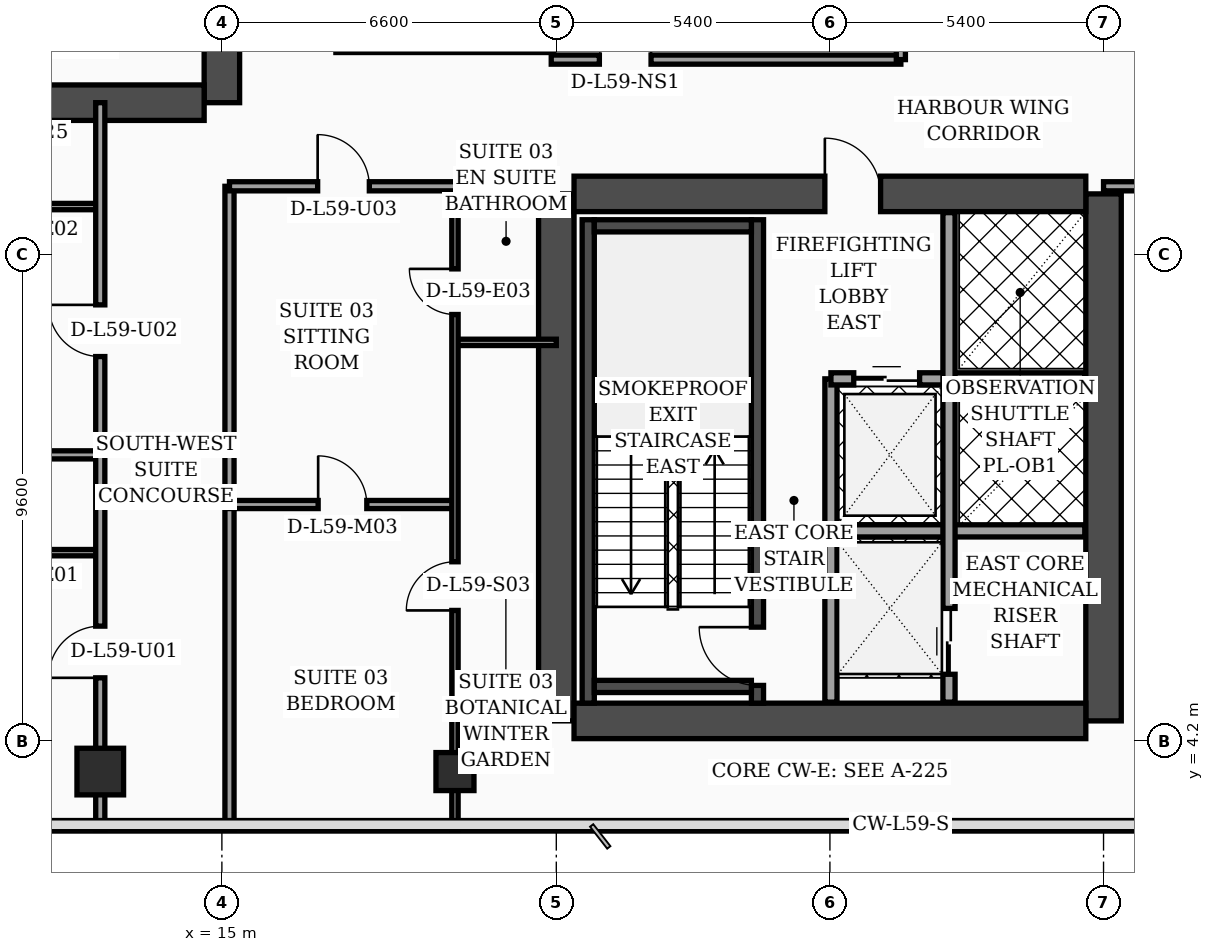
"""IFC4 building model, lengths in metres.
Left out: names, types, materials, properties, quantities, classifications, styles, units other than length and angle.
Written with IfcOpenShell. Run it as: python <this file> out.ifc"""

import sys

from ifc_helpers import new_model, si_unit, direction, frame, frame_2d, origin, origin_2d, place, context, subcontext, project, spatial, rectangle, hollow_rectangle, extrude, element, fill, save


model = new_model("IFC4")
c1 = context("Model", 3, precision=1e-05, world=origin(), true_north=direction((0.0, 1.0)))
c2 = subcontext(c1, "Body", "Model", "MODEL_VIEW")
j1 = project(units=[si_unit("LENGTHUNIT", "METRE"), si_unit("PLANEANGLEUNIT", "RADIAN")], contexts=[c1])
p1 = place(None, origin())
s1 = spatial("IfcSite", under=j1, at=p1, CompositionType="ELEMENT")
p2 = place(p1, origin())
s2 = spatial("IfcBuilding", under=s1, at=p2, CompositionType="ELEMENT")
p3 = place(p2, frame((0.0, 0.0, 239.3)))
s3 = spatial("IfcBuildingStorey", under=s2, at=p3, CompositionType="ELEMENT", Elevation=239.3)
p4 = place(p3, frame((15.0, 16.8, 0.0), z_axis=(0.0, 0.0, 1.0), x_axis=(0.0, 1.0, 0.0)))
e1 = element("IfcWall", 1, at=p4, inside=s3, PredefinedType="SHEAR", context=c2, shape_type="SweptSolid", body=[
    extrude(rectangle(XDim=21.6, YDim=0.7, at=frame_2d((10.8, 0.0))), origin(), (0.0, 0.0, 1.0), 4.05),
])
p5 = place(p4, frame((8.65, 0.0, 0.0)))
e2 = element("IfcOpeningElement", 2, at=p5, cuts=e1, PredefinedType="OPENING", context=c2, shape_type="SweptSolid", body=[
    extrude(rectangle(XDim=1.1, YDim=2.2, at=frame_2d((0.55, 1.1))), frame((0.0, 0.36, 0.0), z_axis=(0.0, -1.0, 0.0), x_axis=(1.0, 0.0, 0.0)), (0.0, 0.0, 1.0), 0.72),
])
p6 = place(p4, frame((18.9, 0.0, 0.0)))
e3 = element("IfcOpeningElement", 3, at=p6, cuts=e1, PredefinedType="OPENING", context=c2, shape_type="SweptSolid", body=[
    extrude(rectangle(XDim=1.1, YDim=2.2, at=frame_2d((0.55, 1.1))), frame((0.0, 0.36, 0.0), z_axis=(0.0, -1.0, 0.0), x_axis=(1.0, 0.0, 0.0)), (0.0, 0.0, 1.0), 0.72),
])
p7 = place(p3, frame((4.55, 16.8, 0.0), z_axis=(0.0, 0.0, 1.0), x_axis=(1.0, 0.0, 0.0)))
e4 = element("IfcWall", 4, at=p7, inside=s3, PredefinedType="SHEAR", context=c2, shape_type="SweptSolid", body=[
    extrude(rectangle(XDim=10.1, YDim=0.7, at=frame_2d((5.05, 0.0))), origin(), (0.0, 0.0, 1.0), 4.05),
])
for number, where, z_axis, x_axis in (
    (5, (21.6, 4.6, 0.0), (0.0, 0.0, 1.0), (0.0, 1.0, 0.0)),
    (6, (32.4, 4.6, 0.0), (0.0, 0.0, 1.0), (0.0, 1.0, 0.0)),
):
    element("IfcWall", number, at=place(p3, frame(where, z_axis=z_axis, x_axis=x_axis)), inside=s3, PredefinedType="SHEAR", context=c2, shape_type="SweptSolid", body=[
        extrude(rectangle(XDim=10.4, YDim=0.7, at=frame_2d((5.2, 0.0))), origin(), (0.0, 0.0, 1.0), 4.05),
    ])
p8 = place(p3, frame((21.95, 15.0, 0.0), z_axis=(0.0, 0.0, 1.0), x_axis=(1.0, 0.0, 0.0)))
e7 = element("IfcWall", 7, at=p8, inside=s3, PredefinedType="SHEAR", context=c2, shape_type="SweptSolid", body=[
    extrude(rectangle(XDim=10.1, YDim=0.7, at=frame_2d((5.05, 0.0))), origin(), (0.0, 0.0, 1.0), 4.05),
])
p9 = place(p8, frame((4.95, 0.0, 0.0)))
e8 = element("IfcOpeningElement", 8, at=p9, cuts=e7, PredefinedType="OPENING", context=c2, shape_type="SweptSolid", body=[
    extrude(rectangle(XDim=1.1, YDim=2.2, at=frame_2d((0.55, 1.1))), frame((0.0, 0.36, 0.0), z_axis=(0.0, -1.0, 0.0), x_axis=(1.0, 0.0, 0.0)), (0.0, 0.0, 1.0), 0.72),
])
p10 = place(p3, frame((21.95, 4.6, 0.0), z_axis=(0.0, 0.0, 1.0), x_axis=(1.0, 0.0, 0.0)))
e9 = element("IfcWall", 9, at=p10, inside=s3, PredefinedType="SHEAR", context=c2, shape_type="SweptSolid", body=[
    extrude(rectangle(XDim=10.1, YDim=0.7, at=frame_2d((5.05, 0.0))), origin(), (0.0, 0.0, 1.0), 4.05),
])
p11 = place(p3, frame((22.23, 4.95, 0.0), z_axis=(0.0, 0.0, 1.0), x_axis=(0.0, 1.0, 0.0)))
e10 = element("IfcWall", 10, at=p11, inside=s3, PredefinedType="SOLIDWALL", context=c2, shape_type="SweptSolid", body=[
    extrude(rectangle(XDim=9.54, YDim=0.24, at=frame_2d((4.77, 0.0))), origin(), (0.0, 0.0, 1.0), 4.05),
])
p12 = place(p3, frame((25.57, 4.95, 0.0), z_axis=(0.0, 0.0, 1.0), x_axis=(0.0, 1.0, 0.0)))
e11 = element("IfcWall", 11, at=p12, inside=s3, PredefinedType="SOLIDWALL", context=c2, shape_type="SweptSolid", body=[
    extrude(rectangle(XDim=9.54, YDim=0.24, at=frame_2d((4.77, 0.0))), origin(), (0.0, 0.0, 1.0), 4.05),
])
p13 = place(p12, frame((0.35, 0.0, 0.0)))
e12 = element("IfcOpeningElement", 12, at=p13, cuts=e11, PredefinedType="OPENING", context=c2, shape_type="SweptSolid", body=[
    extrude(rectangle(XDim=1.15, YDim=2.2, at=frame_2d((0.575, 1.1))), frame((0.0, 0.13, 0.0), z_axis=(0.0, -1.0, 0.0), x_axis=(1.0, 0.0, 0.0)), (0.0, 0.0, 1.0), 0.26),
])
for number, where, z_axis, x_axis in (
    (13, (22.35, 5.28, 0.0), (0.0, 0.0, 1.0), (1.0, 0.0, 0.0)),
    (14, (22.35, 14.37, 0.0), (0.0, 0.0, 1.0), (1.0, 0.0, 0.0)),
):
    element("IfcWall", number, at=place(p3, frame(where, z_axis=z_axis, x_axis=x_axis)), inside=s3, PredefinedType="SOLIDWALL", context=c2, shape_type="SweptSolid", body=[
        extrude(rectangle(XDim=3.1, YDim=0.24, at=frame_2d((1.55, 0.0))), origin(), (0.0, 0.0, 1.0), 4.05),
    ])
p14 = place(p3, frame((12.6, 3.6, 0.0), z_axis=(0.0, 0.0, 1.0), x_axis=(1.0, 0.0, 0.0)))
e15 = element("IfcColumn", 15, at=p14, inside=s3, PredefinedType="COLUMN", context=c2, shape_type="SweptSolid", body=[
    extrude(rectangle(XDim=0.92, YDim=0.92, at=origin_2d()), origin(), (0.0, 0.0, 1.0), 4.05),
])
p15 = place(p3, frame((19.6, 3.6, 0.0), z_axis=(0.0, 0.0, 1.0), x_axis=(1.0, 0.0, 0.0)))
e16 = element("IfcColumn", 16, at=p15, inside=s3, PredefinedType="COLUMN", context=c2, shape_type="SweptSolid", body=[
    extrude(hollow_rectangle(XDim=0.75, YDim=0.75, WallThickness=0.032, at=origin_2d()), origin(), (0.0, 0.0, 1.0), 4.05),
])
p16 = place(p3, frame((27.02, 4.97, 0.0), z_axis=(0.0, 0.0, 1.0), x_axis=(0.0, 1.0, 0.0)))
e17 = element("IfcWall", 17, at=p16, inside=s3, PredefinedType="SOLIDWALL", context=c2, shape_type="SweptSolid", body=[
    extrude(rectangle(XDim=6.38, YDim=0.24, at=frame_2d((3.19, 0.0))), origin(), (0.0, 0.0, 1.0), 4.05),
])
p17 = place(p3, frame((27.02, 11.35, 0.0), z_axis=(0.0, 0.0, 1.0), x_axis=(1.0, 0.0, 0.0)))
e18 = element("IfcWall", 18, at=p17, inside=s3, PredefinedType="SOLIDWALL", context=c2, shape_type="SweptSolid", body=[
    extrude(rectangle(XDim=5.01, YDim=0.24, at=frame_2d((2.505, 0.0))), origin(), (0.0, 0.0, 1.0), 4.05),
])
p18 = place(p17, frame((0.45, 0.0, 0.0)))
e19 = element("IfcOpeningElement", 19, at=p18, cuts=e18, PredefinedType="OPENING", context=c2, shape_type="SweptSolid", body=[
    extrude(rectangle(XDim=1.3, YDim=2.35, at=frame_2d((0.65, 1.175))), frame((0.0, 0.13, 0.0), z_axis=(0.0, -1.0, 0.0), x_axis=(1.0, 0.0, 0.0)), (0.0, 0.0, 1.0), 0.26),
])
p19 = place(p3, frame((27.02, 8.35, 0.0), z_axis=(0.0, 0.0, 1.0), x_axis=(1.0, 0.0, 0.0)))
e20 = element("IfcWall", 20, at=p19, inside=s3, PredefinedType="SOLIDWALL", context=c2, shape_type="SweptSolid", body=[
    extrude(rectangle(XDim=5.01, YDim=0.24, at=frame_2d((2.505, 0.0))), origin(), (0.0, 0.0, 1.0), 4.05),
])
p20 = place(p3, frame((29.35, 4.97, 0.0), z_axis=(0.0, 0.0, 1.0), x_axis=(0.0, 1.0, 0.0)))
e21 = element("IfcWall", 21, at=p20, inside=s3, PredefinedType="SOLIDWALL", context=c2, shape_type="SweptSolid", body=[
    extrude(rectangle(XDim=9.66, YDim=0.24, at=frame_2d((4.83, 0.0))), origin(), (0.0, 0.0, 1.0), 4.05),
])
p21 = place(p20, frame((0.55, 0.0, 0.0)))
e22 = element("IfcOpeningElement", 22, at=p21, cuts=e21, PredefinedType="OPENING", context=c2, shape_type="SweptSolid", body=[
    extrude(rectangle(XDim=1.3, YDim=2.35, at=frame_2d((0.65, 1.175))), frame((0.0, 0.13, 0.0), z_axis=(0.0, -1.0, 0.0), x_axis=(1.0, 0.0, 0.0)), (0.0, 0.0, 1.0), 0.26),
])
p22 = place(p3, frame((3.2, 7.92, 0.0), z_axis=(0.0, 0.0, 1.0), x_axis=(1.0, 0.0, 0.0)))
e23 = element("IfcWall", 23, at=p22, inside=s3, PredefinedType="PARTITIONING", context=c2, shape_type="SweptSolid", body=[
    extrude(rectangle(XDim=9.4, YDim=0.125, at=frame_2d((4.7, 0.0))), origin(), (0.0, 0.0, 1.0), 3.5),
])
p23 = place(p22, frame((3.3, 0.0, 0.0)))
e24 = element("IfcOpeningElement", 24, at=p23, cuts=e23, PredefinedType="OPENING", context=c2, shape_type="SweptSolid", body=[
    extrude(rectangle(XDim=0.96, YDim=2.2, at=frame_2d((0.48, 1.1))), frame((0.0, 0.073, 0.0), z_axis=(0.0, -1.0, 0.0), x_axis=(1.0, 0.0, 0.0)), (0.0, 0.0, 1.0), 0.145),
])
p24 = place(p22, frame((7.49, 0.0, 0.0)))
e25 = element("IfcOpeningElement", 25, at=p24, cuts=e23, PredefinedType="OPENING", context=c2, shape_type="SweptSolid", body=[
    extrude(rectangle(XDim=0.9, YDim=2.15, at=frame_2d((0.45, 1.075))), frame((0.0, 0.073, 0.0), z_axis=(0.0, -1.0, 0.0), x_axis=(1.0, 0.0, 0.0)), (0.0, 0.0, 1.0), 0.145),
])
p25 = place(p3, frame((0.08, 14.75, 0.0), z_axis=(0.0, 0.0, 1.0), x_axis=(1.0, 0.0, 0.0)))
e26 = element("IfcWall", 26, at=p25, inside=s3, PredefinedType="PARTITIONING", context=c2, shape_type="SweptSolid", body=[
    extrude(rectangle(XDim=12.52, YDim=0.125, at=frame_2d((6.26, 0.0))), origin(), (0.0, 0.0, 1.0), 3.5),
])
p26 = place(p25, frame((4.32, 0.0, 0.0)))
e27 = element("IfcOpeningElement", 27, at=p26, cuts=e26, PredefinedType="OPENING", context=c2, shape_type="SweptSolid", body=[
    extrude(rectangle(XDim=0.96, YDim=2.2, at=frame_2d((0.48, 1.1))), frame((0.0, 0.073, 0.0), z_axis=(0.0, -1.0, 0.0), x_axis=(1.0, 0.0, 0.0)), (0.0, 0.0, 1.0), 0.145),
])
p27 = place(p25, frame((10.61, 0.0, 0.0)))
e28 = element("IfcOpeningElement", 28, at=p27, cuts=e26, PredefinedType="OPENING", context=c2, shape_type="SweptSolid", body=[
    extrude(rectangle(XDim=0.9, YDim=2.15, at=frame_2d((0.45, 1.075))), frame((0.0, 0.073, 0.0), z_axis=(0.0, -1.0, 0.0), x_axis=(1.0, 0.0, 0.0)), (0.0, 0.0, 1.0), 0.145),
])
p28 = place(p3, frame((0.08, 9.85, 0.0), z_axis=(0.0, 0.0, 1.0), x_axis=(1.0, 0.0, 0.0)))
e29 = element("IfcWall", 29, at=p28, inside=s3, PredefinedType="PARTITIONING", context=c2, shape_type="SweptSolid", body=[
    extrude(rectangle(XDim=12.52, YDim=0.16, at=frame_2d((6.26, 0.0))), origin(), (0.0, 0.0, 1.0), 3.5),
])
p29 = place(p3, frame((12.6, 2.44, 0.0), z_axis=(0.0, 0.0, 1.0), x_axis=(0.0, 1.0, 0.0)))
e30 = element("IfcWall", 30, at=p29, inside=s3, PredefinedType="PARTITIONING", context=c2, shape_type="SweptSolid", body=[
    extrude(rectangle(XDim=14.36, YDim=0.18, at=frame_2d((7.18, 0.0))), origin(), (0.0, 0.0, 1.0), 2.35),
])
p30 = place(p29, frame((3.01, 0.0, 0.0)))
e31 = element("IfcOpeningElement", 31, at=p30, cuts=e30, PredefinedType="OPENING", context=c2, shape_type="SweptSolid", body=[
    extrude(rectangle(XDim=1.02, YDim=2.2, at=frame_2d((0.51, 1.1))), frame((0.0, 0.1, 0.0), z_axis=(0.0, -1.0, 0.0), x_axis=(1.0, 0.0, 0.0)), (0.0, 0.0, 1.0), 0.2),
])
p31 = place(p29, frame((9.35, 0.0, 0.0)))
e32 = element("IfcOpeningElement", 32, at=p31, cuts=e30, PredefinedType="OPENING", context=c2, shape_type="SweptSolid", body=[
    extrude(rectangle(XDim=1.02, YDim=2.2, at=frame_2d((0.51, 1.1))), frame((0.0, 0.1, 0.0), z_axis=(0.0, -1.0, 0.0), x_axis=(1.0, 0.0, 0.0)), (0.0, 0.0, 1.0), 0.2),
])
p32 = place(p3, frame((15.15, 2.44, 0.0), z_axis=(0.0, 0.0, 1.0), x_axis=(0.0, 1.0, 0.0)))
e33 = element("IfcWall", 33, at=p32, inside=s3, PredefinedType="PARTITIONING", context=c2, shape_type="SweptSolid", body=[
    extrude(rectangle(XDim=12.71, YDim=0.18, at=frame_2d((6.355, 0.0))), origin(), (0.0, 0.0, 1.0), 2.35),
])
p33 = place(p3, frame((19.6, 12.07, 0.0), z_axis=(0.0, 0.0, 1.0), x_axis=(1.0, 0.0, 0.0)))
e34 = element("IfcWall", 34, at=p33, inside=s3, PredefinedType="PARTITIONING", context=c2, shape_type="SweptSolid", body=[
    extrude(rectangle(XDim=2.0, YDim=0.125, at=frame_2d((1.0, 0.0))), origin(), (0.0, 0.0, 1.0), 4.05),
])
p34 = place(p3, frame((15.15, 8.87, 0.0), z_axis=(0.0, 0.0, 1.0), x_axis=(1.0, 0.0, 0.0)))
e35 = element("IfcWall", 35, at=p34, inside=s3, PredefinedType="PARTITIONING", context=c2, shape_type="SweptSolid", body=[
    extrude(rectangle(XDim=4.45, YDim=0.16, at=frame_2d((2.225, 0.0))), origin(), (0.0, 0.0, 1.0), 4.05),
])
p35 = place(p34, frame((1.75, 0.0, 0.0)))
e36 = element("IfcOpeningElement", 36, at=p35, cuts=e35, PredefinedType="OPENING", context=c2, shape_type="SweptSolid", body=[
    extrude(rectangle(XDim=0.96, YDim=2.2, at=frame_2d((0.48, 1.1))), frame((0.0, 0.09, 0.0), z_axis=(0.0, -1.0, 0.0), x_axis=(1.0, 0.0, 0.0)), (0.0, 0.0, 1.0), 0.18),
])
p36 = place(p3, frame((19.6, 2.44, 0.0), z_axis=(0.0, 0.0, 1.0), x_axis=(0.0, 1.0, 0.0)))
e37 = element("IfcWall", 37, at=p36, inside=s3, PredefinedType="PARTITIONING", context=c2, shape_type="SweptSolid", body=[
    extrude(rectangle(XDim=12.71, YDim=0.125, at=frame_2d((6.355, 0.0))), origin(), (0.0, 0.0, 1.0), 2.35),
])
p37 = place(p36, frame((4.34, 0.0, 0.0)))
e38 = element("IfcOpeningElement", 38, at=p37, cuts=e37, PredefinedType="OPENING", context=c2, shape_type="SweptSolid", body=[
    extrude(rectangle(XDim=0.96, YDim=2.2, at=frame_2d((0.48, 1.1))), frame((0.0, 0.073, 0.0), z_axis=(0.0, -1.0, 0.0), x_axis=(1.0, 0.0, 0.0)), (0.0, 0.0, 1.0), 0.145),
])
p38 = place(p36, frame((10.18, 0.0, 0.0)))
e39 = element("IfcOpeningElement", 39, at=p38, cuts=e37, PredefinedType="OPENING", context=c2, shape_type="SweptSolid", body=[
    extrude(rectangle(XDim=0.9, YDim=2.15, at=frame_2d((0.45, 1.075))), frame((0.0, 0.073, 0.0), z_axis=(0.0, -1.0, 0.0), x_axis=(1.0, 0.0, 0.0)), (0.0, 0.0, 1.0), 0.145),
])
p39 = place(p3, frame((15.15, 15.15, 0.0), z_axis=(0.0, 0.0, 1.0), x_axis=(1.0, 0.0, 0.0)))
e40 = element("IfcWall", 40, at=p39, inside=s3, PredefinedType="PARTITIONING", context=c2, shape_type="SweptSolid", body=[
    extrude(rectangle(XDim=6.45, YDim=0.18, at=frame_2d((3.225, 0.0))), origin(), (0.0, 0.0, 1.0), 2.35),
])
p40 = place(p39, frame((1.74, 0.0, 0.0)))
e41 = element("IfcOpeningElement", 41, at=p40, cuts=e40, PredefinedType="OPENING", context=c2, shape_type="SweptSolid", body=[
    extrude(rectangle(XDim=1.02, YDim=2.2, at=frame_2d((0.51, 1.1))), frame((0.0, 0.1, 0.0), z_axis=(0.0, -1.0, 0.0), x_axis=(1.0, 0.0, 0.0)), (0.0, 0.0, 1.0), 0.2),
])
p41 = place(p3, frame((17.25, 17.88, 0.0), z_axis=(0.0, 0.0, 1.0), x_axis=(1.0, 0.0, 0.0)))
e42 = element("IfcWall", 42, at=p41, inside=s3, PredefinedType="PARTITIONING", context=c2, shape_type="SweptSolid", body=[
    extrude(rectangle(XDim=4.3, YDim=0.18, at=frame_2d((2.15, 0.0))), origin(), (0.0, 0.0, 1.0), 4.05),
])
p42 = place(p3, frame((32.4, 15.15, 0.0), z_axis=(0.0, 0.0, 1.0), x_axis=(1.0, 0.0, 0.0)))
e43 = element("IfcWall", 43, at=p42, inside=s3, PredefinedType="PARTITIONING", context=c2, shape_type="SweptSolid", body=[
    extrude(rectangle(XDim=10.4, YDim=0.18, at=frame_2d((5.2, 0.0))), origin(), (0.0, 0.0, 1.0), 2.35),
])
p43 = place(p42, frame((1.1, 0.0, 0.0)))
e44 = element("IfcOpeningElement", 44, at=p43, cuts=e43, PredefinedType="OPENING", context=c2, shape_type="SweptSolid", body=[
    extrude(rectangle(XDim=1.5, YDim=2.22, at=frame_2d((0.75, 1.11))), frame((0.0, 0.1, 0.0), z_axis=(0.0, -1.0, 0.0), x_axis=(1.0, 0.0, 0.0)), (0.0, 0.0, 1.0), 0.2),
])
p44 = place(p42, frame((6.05, 0.0, 0.0)))
e45 = element("IfcOpeningElement", 45, at=p44, cuts=e43, PredefinedType="OPENING", context=c2, shape_type="SweptSolid", body=[
    extrude(rectangle(XDim=1.02, YDim=2.2, at=frame_2d((0.51, 1.1))), frame((0.0, 0.1, 0.0), z_axis=(0.0, -1.0, 0.0), x_axis=(1.0, 0.0, 0.0)), (0.0, 0.0, 1.0), 0.2),
])
p45 = place(p3, frame((21.5, 17.65, 0.0), z_axis=(0.0, 0.0, 1.0), x_axis=(1.0, 0.0, 0.0)))
e46 = element("IfcWall", 46, at=p45, inside=s3, PredefinedType="PARTITIONING", context=c2, shape_type="SweptSolid", body=[
    extrude(rectangle(XDim=6.9, YDim=0.18, at=frame_2d((3.45, 0.0))), origin(), (0.0, 0.0, 1.0), 2.35),
])
p46 = place(p45, frame((0.95, 0.0, 0.0)))
e47 = element("IfcOpeningElement", 47, at=p46, cuts=e46, PredefinedType="OPENING", context=c2, shape_type="SweptSolid", body=[
    extrude(rectangle(XDim=1.02, YDim=2.2, at=frame_2d((0.51, 1.1))), frame((0.0, 0.1, 0.0), z_axis=(0.0, -1.0, 0.0), x_axis=(1.0, 0.0, 0.0)), (0.0, 0.0, 1.0), 0.2),
])
p47 = place(p3, frame((28.4, 17.65, 0.0), z_axis=(0.0, 0.0, 1.0), x_axis=(0.0, 1.0, 0.0)))
e48 = element("IfcWall", 48, at=p47, inside=s3, PredefinedType="PARTITIONING", context=c2, shape_type="SweptSolid", body=[
    extrude(rectangle(XDim=13.16, YDim=0.18, at=frame_2d((6.58, 0.0))), origin(), (0.0, 0.0, 1.0), 2.35),
])
p48 = place(p18, origin())
e49 = element("IfcDoor", 49, at=p48, inside=s3, OperationType="DOUBLE_DOOR_SLIDING", PredefinedType="DOOR", context=c2, shape_type="SweptSolid", body=[
    extrude(rectangle(XDim=1.3, YDim=2.35, at=frame_2d((0.65, 1.175))), frame((0.0, 0.025, 0.0), z_axis=(0.0, -1.0, 0.0), x_axis=(1.0, 0.0, 0.0)), (0.0, 0.0, 1.0), 0.05),
])
fill(e19, e49)
p49 = place(p21, origin())
e50 = element("IfcDoor", 50, at=p49, inside=s3, OperationType="DOUBLE_DOOR_SLIDING", PredefinedType="DOOR", context=c2, shape_type="SweptSolid", body=[
    extrude(rectangle(XDim=1.3, YDim=2.35, at=frame_2d((0.65, 1.175))), frame((0.0, 0.025, 0.0), z_axis=(0.0, -1.0, 0.0), x_axis=(1.0, 0.0, 0.0)), (0.0, 0.0, 1.0), 0.05),
])
fill(e22, e50)
p50 = place(p30, origin())
e51 = element("IfcDoor", 51, at=p50, inside=s3, OperationType="SINGLE_SWING_LEFT", PredefinedType="DOOR", context=c2, shape_type="SweptSolid", body=[
    extrude(rectangle(XDim=1.02, YDim=2.2, at=frame_2d((0.51, 1.1))), frame((0.0, 0.025, 0.0), z_axis=(0.0, -1.0, 0.0), x_axis=(1.0, 0.0, 0.0)), (0.0, 0.0, 1.0), 0.05),
])
fill(e31, e51)
p51 = place(p31, origin())
e52 = element("IfcDoor", 52, at=p51, inside=s3, OperationType="SINGLE_SWING_RIGHT", PredefinedType="DOOR", context=c2, shape_type="SweptSolid", body=[
    extrude(rectangle(XDim=1.02, YDim=2.2, at=frame_2d((0.51, 1.1))), frame((0.0, 0.025, 0.0), z_axis=(0.0, -1.0, 0.0), x_axis=(1.0, 0.0, 0.0)), (0.0, 0.0, 1.0), 0.05),
])
fill(e32, e52)
p52 = place(p35, origin())
e53 = element("IfcDoor", 53, at=p52, inside=s3, OperationType="SINGLE_SWING_LEFT", PredefinedType="DOOR", context=c2, shape_type="SweptSolid", body=[
    extrude(rectangle(XDim=0.96, YDim=2.2, at=frame_2d((0.48, 1.1))), frame((0.0, 0.025, 0.0), z_axis=(0.0, -1.0, 0.0), x_axis=(1.0, 0.0, 0.0)), (0.0, 0.0, 1.0), 0.05),
])
fill(e36, e53)
p53 = place(p37, origin())
e54 = element("IfcDoor", 54, at=p53, inside=s3, OperationType="SINGLE_SWING_LEFT", PredefinedType="DOOR", context=c2, shape_type="SweptSolid", body=[
    extrude(rectangle(XDim=0.96, YDim=2.2, at=frame_2d((0.48, 1.1))), frame((0.0, 0.025, 0.0), z_axis=(0.0, -1.0, 0.0), x_axis=(1.0, 0.0, 0.0)), (0.0, 0.0, 1.0), 0.05),
])
fill(e38, e54)
p54 = place(p38, origin())
e55 = element("IfcDoor", 55, at=p54, inside=s3, OperationType="SINGLE_SWING_RIGHT", PredefinedType="DOOR", context=c2, shape_type="SweptSolid", body=[
    extrude(rectangle(XDim=0.9, YDim=2.15, at=frame_2d((0.45, 1.075))), frame((0.0, 0.025, 0.0), z_axis=(0.0, -1.0, 0.0), x_axis=(1.0, 0.0, 0.0)), (0.0, 0.0, 1.0), 0.05),
])
fill(e39, e55)
p55 = place(p40, origin())
e56 = element("IfcDoor", 56, at=p55, inside=s3, OperationType="SINGLE_SWING_LEFT", PredefinedType="DOOR", context=c2, shape_type="SweptSolid", body=[
    extrude(rectangle(XDim=1.02, YDim=2.2, at=frame_2d((0.51, 1.1))), frame((0.0, 0.025, 0.0), z_axis=(0.0, -1.0, 0.0), x_axis=(1.0, 0.0, 0.0)), (0.0, 0.0, 1.0), 0.05),
])
fill(e41, e56)
p56 = place(p46, origin())
e57 = element("IfcDoor", 57, at=p56, inside=s3, OperationType="SINGLE_SWING_RIGHT", PredefinedType="DOOR", context=c2, shape_type="SweptSolid", body=[
    extrude(rectangle(XDim=1.02, YDim=2.2, at=frame_2d((0.51, 1.1))), frame((0.0, 0.025, 0.0), z_axis=(0.0, -1.0, 0.0), x_axis=(1.0, 0.0, 0.0)), (0.0, 0.0, 1.0), 0.05),
])
fill(e47, e57)
p57 = place(p13, origin())
e58 = element("IfcDoor", 58, at=p57, inside=s3, OperationType="SINGLE_SWING_RIGHT", PredefinedType="DOOR", context=c2, shape_type="SweptSolid", body=[
    extrude(rectangle(XDim=1.15, YDim=2.2, at=frame_2d((0.575, 1.1))), frame((0.0, 0.025, 0.0), z_axis=(0.0, -1.0, 0.0), x_axis=(1.0, 0.0, 0.0)), (0.0, 0.0, 1.0), 0.05),
])
fill(e12, e58)
p58 = place(p9, origin())
e59 = element("IfcDoor", 59, at=p58, inside=s3, OperationType="SINGLE_SWING_LEFT", PredefinedType="DOOR", context=c2, shape_type="SweptSolid", body=[
    extrude(rectangle(XDim=1.1, YDim=2.2, at=frame_2d((0.55, 1.1))), frame((0.0, 0.025, 0.0), z_axis=(0.0, -1.0, 0.0), x_axis=(1.0, 0.0, 0.0)), (0.0, 0.0, 1.0), 0.05),
])
fill(e8, e59)
save(model, sys.argv[1])
